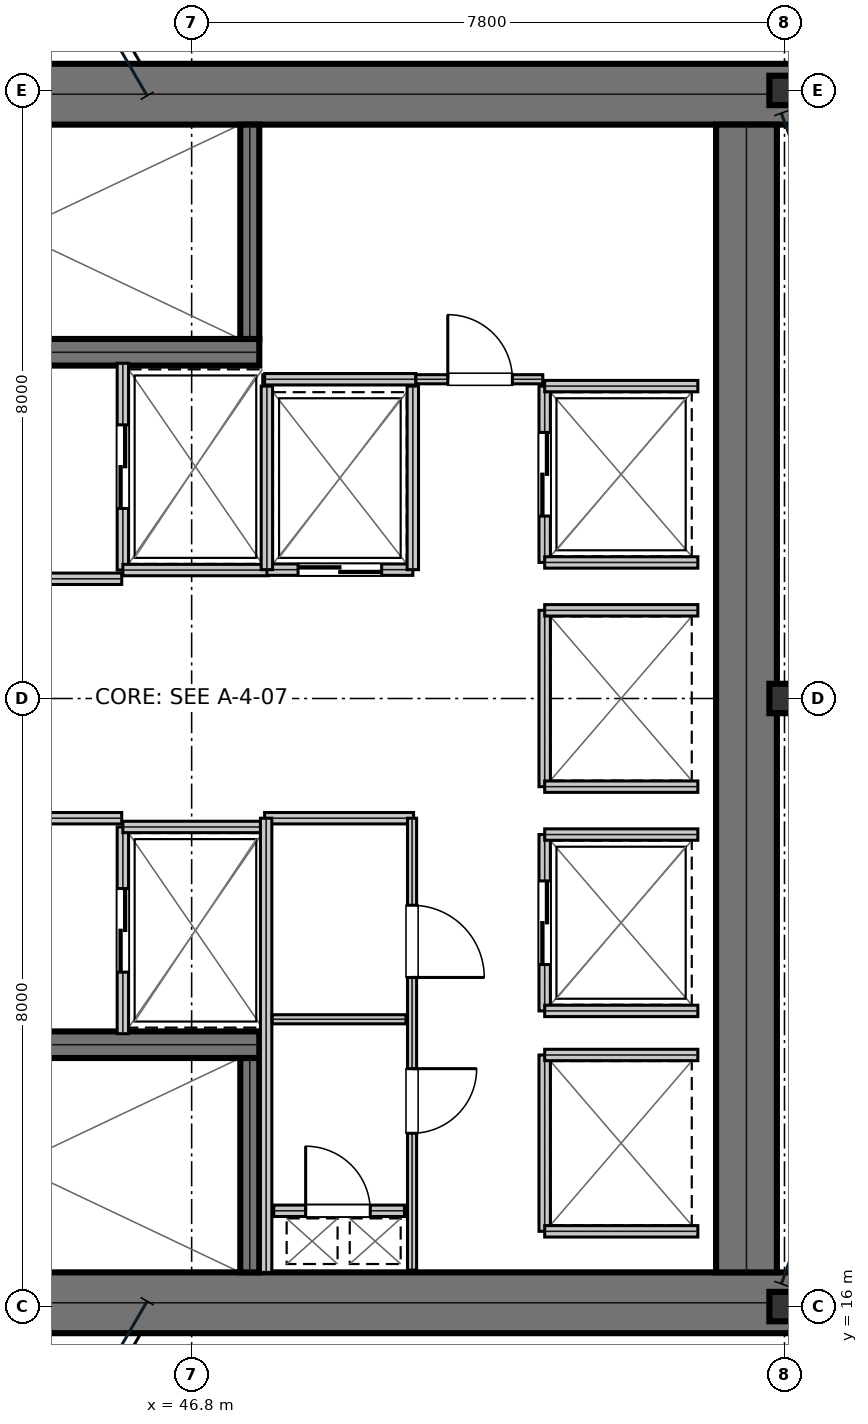
"""IFC4 building model, lengths in metres.
Left out: names, types, materials, properties, quantities, classifications, styles, units other than length and angle.
Written with IfcOpenShell. Run it as: python <this file> out.ifc"""

import sys

from ifc_helpers import new_model, si_unit, direction, frame, frame_2d, origin, origin_2d, place, context, subcontext, project, spatial, rectangle, i_section, extrude, element, fill, save


model = new_model("IFC4")
c1 = context("Model", 3, precision=1e-05, world=origin(), true_north=direction((0.0, 1.0)))
c2 = subcontext(c1, "Body", "Model", "MODEL_VIEW")
j1 = project(units=[si_unit("LENGTHUNIT", "METRE"), si_unit("PLANEANGLEUNIT", "RADIAN")], contexts=[c1])
p1 = place(None, origin())
s1 = spatial("IfcSite", under=j1, at=p1, CompositionType="ELEMENT")
p2 = place(p1, origin())
s2 = spatial("IfcBuilding", under=s1, at=p2, CompositionType="ELEMENT")
p3 = place(p2, frame((0.0, 0.0, 173.55)))
s3 = spatial("IfcBuildingStorey", under=s2, at=p3, CompositionType="ELEMENT", Elevation=173.55)
for number, where, z_axis, x_axis in (
    (1, (38.8, 31.95, 0.0), (0.0, 0.0, 1.0), (1.0, 0.0, 0.0)),
    (2, (38.8, 16.05, 0.0), (0.0, 0.0, 1.0), (1.0, 0.0, 0.0)),
):
    element("IfcWall", number, at=place(p3, frame(where, z_axis=z_axis, x_axis=x_axis)), inside=s3, PredefinedType="SHEAR", context=c2, shape_type="SweptSolid", body=[
        extrude(rectangle(XDim=16.0, YDim=0.8, at=frame_2d((8.0, 0.0))), origin(), (0.0, 0.0, 1.0), 3.81),
    ])
p4 = place(p3, frame((54.1, 16.45, 0.0), z_axis=(0.0, 0.0, 1.0), x_axis=(0.0, 1.0, 0.0)))
e3 = element("IfcWall", 3, at=p4, inside=s3, PredefinedType="SHEAR", context=c2, shape_type="SweptSolid", body=[
    extrude(rectangle(XDim=15.1, YDim=0.8, at=frame_2d((7.55, 0.0))), origin(), (0.0, 0.0, 1.0), 3.81),
])
p5 = place(p3, frame((39.98, 28.555, 0.0), z_axis=(0.0, 0.0, 1.0), x_axis=(1.0, 0.0, 0.0)))
e4 = element("IfcWall", 4, at=p5, inside=s3, PredefinedType="SHEAR", context=c2, shape_type="SweptSolid", body=[
    extrude(rectangle(XDim=7.71, YDim=0.35, at=frame_2d((3.855, 0.0))), origin(), (0.0, 0.0, 1.0), 3.81),
])
p6 = place(p5, frame((0.25, 0.0, 0.0)))
e5 = element("IfcOpeningElement", 5, at=p6, cuts=e4, PredefinedType="OPENING", context=c2, shape_type="SweptSolid", body=[
    extrude(rectangle(XDim=1.1, YDim=2.15, at=frame_2d((0.55, 1.075))), frame((0.0, 0.185, 0.0), z_axis=(0.0, -1.0, 0.0), x_axis=(1.0, 0.0, 0.0)), (0.0, 0.0, 1.0), 0.37),
])
p7 = place(p3, frame((39.98, 19.445, 0.0), z_axis=(0.0, 0.0, 1.0), x_axis=(1.0, 0.0, 0.0)))
e6 = element("IfcWall", 6, at=p7, inside=s3, PredefinedType="SHEAR", context=c2, shape_type="SweptSolid", body=[
    extrude(rectangle(XDim=7.71, YDim=0.35, at=frame_2d((3.855, 0.0))), origin(), (0.0, 0.0, 1.0), 3.81),
])
p8 = place(p7, frame((0.25, 0.0, 0.0)))
e7 = element("IfcOpeningElement", 7, at=p8, cuts=e6, PredefinedType="OPENING", context=c2, shape_type="SweptSolid", body=[
    extrude(rectangle(XDim=1.1, YDim=2.15, at=frame_2d((0.55, 1.075))), frame((0.0, 0.185, 0.0), z_axis=(0.0, -1.0, 0.0), x_axis=(1.0, 0.0, 0.0)), (0.0, 0.0, 1.0), 0.37),
])
for number, where, z_axis, x_axis in (
    (8, (47.565, 28.73, 0.0), (0.0, 0.0, 1.0), (0.0, 1.0, 0.0)),
    (9, (47.565, 16.45, 0.0), (0.0, 0.0, 1.0), (0.0, 1.0, 0.0)),
):
    element("IfcWall", number, at=place(p3, frame(where, z_axis=z_axis, x_axis=x_axis)), inside=s3, PredefinedType="SHEAR", context=c2, shape_type="SweptSolid", body=[
        extrude(rectangle(XDim=2.82, YDim=0.25, at=frame_2d((1.41, 0.0))), origin(), (0.0, 0.0, 1.0), 3.81),
    ])
for number, where, z_axis, x_axis in (
    (10, (54.6, 16.0, 0.0), (0.0, 0.0, 1.0), (1.0, 0.0, 0.0)),
    (11, (54.6, 24.0, 0.0), (0.0, 0.0, 1.0), (1.0, 0.0, 0.0)),
    (12, (54.6, 32.0, 0.0), (0.0, 0.0, 1.0), (1.0, 0.0, 0.0)),
):
    element("IfcColumn", number, at=place(p3, frame(where, z_axis=z_axis, x_axis=x_axis)), inside=s3, PredefinedType="COLUMN", context=c2, shape_type="SweptSolid", body=[
        extrude(i_section(OverallWidth=0.398, OverallDepth=0.387, WebThickness=0.021, FlangeThickness=0.033, at=origin_2d()), origin(), (0.0, 0.0, 1.0), 4.044),
    ])
p9 = place(p3, frame((39.98, 25.575, 0.0), z_axis=(0.0, 0.0, 1.0), x_axis=(1.0, 0.0, 0.0)))
e13 = element("IfcWall", 13, at=p9, inside=s3, PredefinedType="PARTITIONING", context=c2, shape_type="SweptSolid", body=[
    extrude(rectangle(XDim=5.9, YDim=0.15, at=frame_2d((2.95, 0.0))), origin(), (0.0, 0.0, 1.0), 3.81),
])
p10 = place(p9, frame((2.35, 0.0, 0.0)))
e14 = element("IfcOpeningElement", 14, at=p10, cuts=e13, PredefinedType="OPENING", context=c2, shape_type="SweptSolid", body=[
    extrude(rectangle(XDim=1.05, YDim=2.15, at=frame_2d((0.525, 1.075))), frame((0.0, 0.085, 0.0), z_axis=(0.0, -1.0, 0.0), x_axis=(1.0, 0.0, 0.0)), (0.0, 0.0, 1.0), 0.17),
])
p11 = place(p3, frame((39.98, 22.425, 0.0), z_axis=(0.0, 0.0, 1.0), x_axis=(1.0, 0.0, 0.0)))
e15 = element("IfcWall", 15, at=p11, inside=s3, PredefinedType="PARTITIONING", context=c2, shape_type="SweptSolid", body=[
    extrude(rectangle(XDim=5.9, YDim=0.15, at=frame_2d((2.95, 0.0))), origin(), (0.0, 0.0, 1.0), 3.81),
])
p12 = place(p11, frame((2.35, 0.0, 0.0)))
e16 = element("IfcOpeningElement", 16, at=p12, cuts=e15, PredefinedType="OPENING", context=c2, shape_type="SweptSolid", body=[
    extrude(rectangle(XDim=1.05, YDim=2.15, at=frame_2d((0.525, 1.075))), frame((0.0, 0.085, 0.0), z_axis=(0.0, -1.0, 0.0), x_axis=(1.0, 0.0, 0.0)), (0.0, 0.0, 1.0), 0.17),
])
p13 = place(p3, frame((45.895, 25.69, 0.0), z_axis=(0.0, 0.0, 1.0), x_axis=(0.0, 1.0, 0.0)))
e17 = element("IfcWall", 17, at=p13, inside=s3, PredefinedType="PARTITIONING", context=c2, shape_type="SweptSolid", body=[
    extrude(rectangle(XDim=2.72, YDim=0.15, at=frame_2d((1.36, 0.0))), origin(), (0.0, 0.0, 1.0), 3.81),
])
p14 = place(p13, frame((0.81, 0.0, 0.0)))
e18 = element("IfcOpeningElement", 18, at=p14, cuts=e17, PredefinedType="OPENING", context=c2, shape_type="SweptSolid", body=[
    extrude(rectangle(XDim=1.1, YDim=2.15, at=frame_2d((0.55, 1.075))), frame((0.0, 0.085, 0.0), z_axis=(0.0, -1.0, 0.0), x_axis=(1.0, 0.0, 0.0)), (0.0, 0.0, 1.0), 0.17),
])
p15 = place(p3, frame((45.895, 25.69, 0.0), z_axis=(0.0, 0.0, 1.0), x_axis=(1.0, 0.0, 0.0)))
e19 = element("IfcWall", 19, at=p15, inside=s3, PredefinedType="PARTITIONING", context=c2, shape_type="SweptSolid", body=[
    extrude(rectangle(XDim=1.915, YDim=0.15, at=frame_2d((0.958, 0.0))), origin(), (0.0, 0.0, 1.0), 3.81),
])
p16 = place(p3, frame((45.895, 19.59, 0.0), z_axis=(0.0, 0.0, 1.0), x_axis=(0.0, 1.0, 0.0)))
e20 = element("IfcWall", 20, at=p16, inside=s3, PredefinedType="PARTITIONING", context=c2, shape_type="SweptSolid", body=[
    extrude(rectangle(XDim=2.72, YDim=0.15, at=frame_2d((1.36, 0.0))), origin(), (0.0, 0.0, 1.0), 3.81),
])
p17 = place(p16, frame((0.81, 0.0, 0.0)))
e21 = element("IfcOpeningElement", 21, at=p17, cuts=e20, PredefinedType="OPENING", context=c2, shape_type="SweptSolid", body=[
    extrude(rectangle(XDim=1.1, YDim=2.15, at=frame_2d((0.55, 1.075))), frame((0.0, 0.085, 0.0), z_axis=(0.0, -1.0, 0.0), x_axis=(1.0, 0.0, 0.0)), (0.0, 0.0, 1.0), 0.17),
])
p18 = place(p3, frame((45.895, 22.31, 0.0), z_axis=(0.0, 0.0, 1.0), x_axis=(1.0, 0.0, 0.0)))
e22 = element("IfcWall", 22, at=p18, inside=s3, PredefinedType="PARTITIONING", context=c2, shape_type="SweptSolid", body=[
    extrude(rectangle(XDim=1.915, YDim=0.15, at=frame_2d((0.958, 0.0))), origin(), (0.0, 0.0, 1.0), 3.81),
])
p19 = place(p3, frame((47.79, 25.695, 0.0), z_axis=(0.0, 0.0, 1.0), x_axis=(1.0, 0.0, 0.0)))
e23 = element("IfcWall", 23, at=p19, inside=s3, PredefinedType="PARTITIONING", context=c2, shape_type="SweptSolid", body=[
    extrude(rectangle(XDim=1.92, YDim=0.15, at=frame_2d((0.96, 0.0))), origin(), (0.0, 0.0, 1.0), 3.81),
])
p20 = place(p19, frame((0.41, 0.0, 0.0)))
e24 = element("IfcOpeningElement", 24, at=p20, cuts=e23, PredefinedType="OPENING", context=c2, shape_type="SweptSolid", body=[
    extrude(rectangle(XDim=1.1, YDim=2.15, at=frame_2d((0.55, 1.075))), frame((0.0, 0.085, 0.0), z_axis=(0.0, -1.0, 0.0), x_axis=(1.0, 0.0, 0.0)), (0.0, 0.0, 1.0), 0.17),
])
for number, where, z_axis, x_axis in (
    (25, (47.79, 25.695, 0.0), (0.0, 0.0, 1.0), (0.0, 1.0, 0.0)),
    (26, (49.71, 25.695, 0.0), (0.0, 0.0, 1.0), (0.0, 1.0, 0.0)),
):
    element("IfcWall", number, at=place(p3, frame(where, z_axis=z_axis, x_axis=x_axis)), inside=s3, PredefinedType="PARTITIONING", context=c2, shape_type="SweptSolid", body=[
        extrude(rectangle(XDim=2.415, YDim=0.15, at=frame_2d((1.208, 0.0))), origin(), (0.0, 0.0, 1.0), 3.81),
    ])
p21 = place(p3, frame((51.445, 25.79, 0.0), z_axis=(0.0, 0.0, 1.0), x_axis=(0.0, 1.0, 0.0)))
e27 = element("IfcWall", 27, at=p21, inside=s3, PredefinedType="PARTITIONING", context=c2, shape_type="SweptSolid", body=[
    extrude(rectangle(XDim=2.32, YDim=0.15, at=frame_2d((1.16, 0.0))), origin(), (0.0, 0.0, 1.0), 3.81),
])
p22 = place(p21, frame((0.61, 0.0, 0.0)))
e28 = element("IfcOpeningElement", 28, at=p22, cuts=e27, PredefinedType="OPENING", context=c2, shape_type="SweptSolid", body=[
    extrude(rectangle(XDim=1.1, YDim=2.15, at=frame_2d((0.55, 1.075))), frame((0.0, 0.085, 0.0), z_axis=(0.0, -1.0, 0.0), x_axis=(1.0, 0.0, 0.0)), (0.0, 0.0, 1.0), 0.17),
])
for number, where, z_axis, x_axis in (
    (29, (51.445, 25.79, 0.0), (0.0, 0.0, 1.0), (1.0, 0.0, 0.0)),
    (30, (51.445, 28.11, 0.0), (0.0, 0.0, 1.0), (1.0, 0.0, 0.0)),
):
    element("IfcWall", number, at=place(p3, frame(where, z_axis=z_axis, x_axis=x_axis)), inside=s3, PredefinedType="PARTITIONING", context=c2, shape_type="SweptSolid", body=[
        extrude(rectangle(XDim=2.015, YDim=0.15, at=frame_2d((1.007, 0.0))), origin(), (0.0, 0.0, 1.0), 3.81),
    ])
p23 = place(p3, frame((51.445, 19.89, 0.0), z_axis=(0.0, 0.0, 1.0), x_axis=(0.0, 1.0, 0.0)))
e31 = element("IfcWall", 31, at=p23, inside=s3, PredefinedType="PARTITIONING", context=c2, shape_type="SweptSolid", body=[
    extrude(rectangle(XDim=2.32, YDim=0.15, at=frame_2d((1.16, 0.0))), origin(), (0.0, 0.0, 1.0), 3.81),
])
p24 = place(p23, frame((0.61, 0.0, 0.0)))
e32 = element("IfcOpeningElement", 32, at=p24, cuts=e31, PredefinedType="OPENING", context=c2, shape_type="SweptSolid", body=[
    extrude(rectangle(XDim=1.1, YDim=2.15, at=frame_2d((0.55, 1.075))), frame((0.0, 0.085, 0.0), z_axis=(0.0, -1.0, 0.0), x_axis=(1.0, 0.0, 0.0)), (0.0, 0.0, 1.0), 0.17),
])
for number, where, z_axis, x_axis in (
    (33, (51.445, 19.89, 0.0), (0.0, 0.0, 1.0), (1.0, 0.0, 0.0)),
    (34, (51.445, 22.21, 0.0), (0.0, 0.0, 1.0), (1.0, 0.0, 0.0)),
):
    element("IfcWall", number, at=place(p3, frame(where, z_axis=z_axis, x_axis=x_axis)), inside=s3, PredefinedType="PARTITIONING", context=c2, shape_type="SweptSolid", body=[
        extrude(rectangle(XDim=2.015, YDim=0.15, at=frame_2d((1.007, 0.0))), origin(), (0.0, 0.0, 1.0), 3.81),
    ])
p25 = place(p3, frame((51.445, 22.84, 0.0), z_axis=(0.0, 0.0, 1.0), x_axis=(0.0, 1.0, 0.0)))
e35 = element("IfcWall", 35, at=p25, inside=s3, PredefinedType="PARTITIONING", context=c2, shape_type="SweptSolid", body=[
    extrude(rectangle(XDim=2.32, YDim=0.15, at=frame_2d((1.16, 0.0))), origin(), (0.0, 0.0, 1.0), 3.81),
])
for number, where, z_axis, x_axis in (
    (36, (51.445, 22.84, 0.0), (0.0, 0.0, 1.0), (1.0, 0.0, 0.0)),
    (37, (51.445, 25.16, 0.0), (0.0, 0.0, 1.0), (1.0, 0.0, 0.0)),
):
    element("IfcWall", number, at=place(p3, frame(where, z_axis=z_axis, x_axis=x_axis)), inside=s3, PredefinedType="PARTITIONING", context=c2, shape_type="SweptSolid", body=[
        extrude(rectangle(XDim=2.015, YDim=0.15, at=frame_2d((1.007, 0.0))), origin(), (0.0, 0.0, 1.0), 3.81),
    ])
p26 = place(p3, frame((51.445, 16.99, 0.0), z_axis=(0.0, 0.0, 1.0), x_axis=(0.0, 1.0, 0.0)))
e38 = element("IfcWall", 38, at=p26, inside=s3, PredefinedType="PARTITIONING", context=c2, shape_type="SweptSolid", body=[
    extrude(rectangle(XDim=2.32, YDim=0.15, at=frame_2d((1.16, 0.0))), origin(), (0.0, 0.0, 1.0), 3.81),
])
for number, where, z_axis, x_axis in (
    (39, (51.445, 16.99, 0.0), (0.0, 0.0, 1.0), (1.0, 0.0, 0.0)),
    (40, (51.445, 19.31, 0.0), (0.0, 0.0, 1.0), (1.0, 0.0, 0.0)),
):
    element("IfcWall", number, at=place(p3, frame(where, z_axis=z_axis, x_axis=x_axis)), inside=s3, PredefinedType="PARTITIONING", context=c2, shape_type="SweptSolid", body=[
        extrude(rectangle(XDim=2.015, YDim=0.15, at=frame_2d((1.007, 0.0))), origin(), (0.0, 0.0, 1.0), 3.81),
    ])
p27 = place(p3, frame((47.88, 17.26, 0.0), z_axis=(0.0, 0.0, 1.0), x_axis=(1.0, 0.0, 0.0)))
e41 = element("IfcWall", 41, at=p27, inside=s3, PredefinedType="PARTITIONING", context=c2, shape_type="SweptSolid", body=[
    extrude(rectangle(XDim=1.72, YDim=0.15, at=frame_2d((0.86, 0.0))), origin(), (0.0, 0.0, 1.0), 3.81),
])
p28 = place(p27, frame((0.42, 0.0, 0.0)))
e42 = element("IfcOpeningElement", 42, at=p28, cuts=e41, PredefinedType="OPENING", context=c2, shape_type="SweptSolid", body=[
    extrude(rectangle(XDim=0.85, YDim=2.15, at=frame_2d((0.425, 1.075))), frame((0.0, 0.085, 0.0), z_axis=(0.0, -1.0, 0.0), x_axis=(1.0, 0.0, 0.0)), (0.0, 0.0, 1.0), 0.17),
])
p29 = place(p3, frame((47.76, 22.425, 0.0), z_axis=(0.0, 0.0, 1.0), x_axis=(1.0, 0.0, 0.0)))
e43 = element("IfcWall", 43, at=p29, inside=s3, PredefinedType="PARTITIONING", context=c2, shape_type="SweptSolid", body=[
    extrude(rectangle(XDim=1.96, YDim=0.15, at=frame_2d((0.98, 0.0))), origin(), (0.0, 0.0, 1.0), 3.81),
])
p30 = place(p3, frame((47.78, 16.45, 0.0), z_axis=(0.0, 0.0, 1.0), x_axis=(0.0, 1.0, 0.0)))
e44 = element("IfcWall", 44, at=p30, inside=s3, PredefinedType="PARTITIONING", context=c2, shape_type="SweptSolid", body=[
    extrude(rectangle(XDim=5.975, YDim=0.15, at=frame_2d((2.988, 0.0))), origin(), (0.0, 0.0, 1.0), 3.81),
])
p31 = place(p3, frame((47.86, 19.78, 0.0), z_axis=(0.0, 0.0, 1.0), x_axis=(1.0, 0.0, 0.0)))
e45 = element("IfcWall", 45, at=p31, inside=s3, PredefinedType="PARTITIONING", context=c2, shape_type="SweptSolid", body=[
    extrude(rectangle(XDim=1.76, YDim=0.12, at=frame_2d((0.88, 0.0))), origin(), (0.0, 0.0, 1.0), 3.81),
])
p32 = place(p3, frame((49.7, 16.48, 0.0), z_axis=(0.0, 0.0, 1.0), x_axis=(0.0, 1.0, 0.0)))
e46 = element("IfcWall", 46, at=p32, inside=s3, PredefinedType="PARTITIONING", context=c2, shape_type="SweptSolid", body=[
    extrude(rectangle(XDim=5.945, YDim=0.12, at=frame_2d((2.973, 0.0))), origin(), (0.0, 0.0, 1.0), 3.81),
])
p33 = place(p32, frame((1.8, 0.0, 0.0)))
e47 = element("IfcOpeningElement", 47, at=p33, cuts=e46, PredefinedType="OPENING", context=c2, shape_type="SweptSolid", body=[
    extrude(rectangle(XDim=0.85, YDim=2.15, at=frame_2d((0.425, 1.075))), frame((0.0, 0.07, 0.0), z_axis=(0.0, -1.0, 0.0), x_axis=(1.0, 0.0, 0.0)), (0.0, 0.0, 1.0), 0.14),
])
p34 = place(p32, frame((3.85, 0.0, 0.0)))
e48 = element("IfcOpeningElement", 48, at=p34, cuts=e46, PredefinedType="OPENING", context=c2, shape_type="SweptSolid", body=[
    extrude(rectangle(XDim=0.95, YDim=2.15, at=frame_2d((0.475, 1.075))), frame((0.0, 0.07, 0.0), z_axis=(0.0, -1.0, 0.0), x_axis=(1.0, 0.0, 0.0)), (0.0, 0.0, 1.0), 0.14),
])
p35 = place(p3, frame((47.76, 28.2, 0.0), z_axis=(0.0, 0.0, 1.0), x_axis=(1.0, 0.0, 0.0)))
e49 = element("IfcWall", 49, at=p35, inside=s3, PredefinedType="PARTITIONING", context=c2, shape_type="SweptSolid", body=[
    extrude(rectangle(XDim=1.99, YDim=0.15, at=frame_2d((0.995, 0.0))), origin(), (0.0, 0.0, 1.0), 3.81),
])
p36 = place(p3, frame((49.75, 28.2, 0.0), z_axis=(0.0, 0.0, 1.0), x_axis=(1.0, 0.0, 0.0)))
e50 = element("IfcWall", 50, at=p36, inside=s3, PredefinedType="PARTITIONING", context=c2, shape_type="SweptSolid", body=[
    extrude(rectangle(XDim=1.67, YDim=0.12, at=frame_2d((0.835, 0.0))), origin(), (0.0, 0.0, 1.0), 3.81),
])
p37 = place(p36, frame((0.42, 0.0, 0.0)))
e51 = element("IfcOpeningElement", 51, at=p37, cuts=e50, PredefinedType="OPENING", context=c2, shape_type="SweptSolid", body=[
    extrude(rectangle(XDim=0.85, YDim=2.15, at=frame_2d((0.425, 1.075))), frame((0.0, 0.07, 0.0), z_axis=(0.0, -1.0, 0.0), x_axis=(1.0, 0.0, 0.0)), (0.0, 0.0, 1.0), 0.14),
])
p38 = place(p14, frame((1.1, 0.0, 0.0), z_axis=(0.0, 0.0, 1.0), x_axis=(-1.0, 0.0, 0.0)))
e52 = element("IfcDoor", 52, at=p38, inside=s3, OperationType="DOUBLE_DOOR_SLIDING", PredefinedType="DOOR", context=c2, shape_type="SweptSolid", body=[
    extrude(rectangle(XDim=1.1, YDim=2.15, at=frame_2d((0.55, 1.075))), frame((0.0, 0.025, 0.0), z_axis=(0.0, -1.0, 0.0), x_axis=(1.0, 0.0, 0.0)), (0.0, 0.0, 1.0), 0.05),
])
fill(e18, e52)
p39 = place(p17, frame((1.1, 0.0, 0.0), z_axis=(0.0, 0.0, 1.0), x_axis=(-1.0, 0.0, 0.0)))
e53 = element("IfcDoor", 53, at=p39, inside=s3, OperationType="DOUBLE_DOOR_SLIDING", PredefinedType="DOOR", context=c2, shape_type="SweptSolid", body=[
    extrude(rectangle(XDim=1.1, YDim=2.15, at=frame_2d((0.55, 1.075))), frame((0.0, 0.025, 0.0), z_axis=(0.0, -1.0, 0.0), x_axis=(1.0, 0.0, 0.0)), (0.0, 0.0, 1.0), 0.05),
])
fill(e21, e53)
p40 = place(p20, frame((1.1, 0.0, 0.0), z_axis=(0.0, 0.0, 1.0), x_axis=(-1.0, 0.0, 0.0)))
e54 = element("IfcDoor", 54, at=p40, inside=s3, OperationType="DOUBLE_DOOR_SLIDING", PredefinedType="DOOR", context=c2, shape_type="SweptSolid", body=[
    extrude(rectangle(XDim=1.1, YDim=2.15, at=frame_2d((0.55, 1.075))), frame((0.0, 0.025, 0.0), z_axis=(0.0, -1.0, 0.0), x_axis=(1.0, 0.0, 0.0)), (0.0, 0.0, 1.0), 0.05),
])
fill(e24, e54)
p41 = place(p22, frame((1.1, 0.0, 0.0), z_axis=(0.0, 0.0, 1.0), x_axis=(-1.0, 0.0, 0.0)))
e55 = element("IfcDoor", 55, at=p41, inside=s3, OperationType="DOUBLE_DOOR_SLIDING", PredefinedType="DOOR", context=c2, shape_type="SweptSolid", body=[
    extrude(rectangle(XDim=1.1, YDim=2.15, at=frame_2d((0.55, 1.075))), frame((0.0, 0.025, 0.0), z_axis=(0.0, -1.0, 0.0), x_axis=(1.0, 0.0, 0.0)), (0.0, 0.0, 1.0), 0.05),
])
fill(e28, e55)
p42 = place(p24, frame((1.1, 0.0, 0.0), z_axis=(0.0, 0.0, 1.0), x_axis=(-1.0, 0.0, 0.0)))
e56 = element("IfcDoor", 56, at=p42, inside=s3, OperationType="DOUBLE_DOOR_SLIDING", PredefinedType="DOOR", context=c2, shape_type="SweptSolid", body=[
    extrude(rectangle(XDim=1.1, YDim=2.15, at=frame_2d((0.55, 1.075))), frame((0.0, 0.025, 0.0), z_axis=(0.0, -1.0, 0.0), x_axis=(1.0, 0.0, 0.0)), (0.0, 0.0, 1.0), 0.05),
])
fill(e32, e56)
p43 = place(p28, origin())
e57 = element("IfcDoor", 57, at=p43, inside=s3, OperationType="SINGLE_SWING_LEFT", PredefinedType="TRAPDOOR", context=c2, shape_type="SweptSolid", body=[
    extrude(rectangle(XDim=0.85, YDim=2.15, at=frame_2d((0.425, 1.075))), frame((0.0, 0.025, 0.0), z_axis=(0.0, -1.0, 0.0), x_axis=(1.0, 0.0, 0.0)), (0.0, 0.0, 1.0), 0.05),
])
fill(e42, e57)
p44 = place(p33, frame((0.85, 0.0, 0.0), z_axis=(0.0, 0.0, 1.0), x_axis=(-1.0, 0.0, 0.0)))
e58 = element("IfcDoor", 58, at=p44, inside=s3, OperationType="SINGLE_SWING_LEFT", PredefinedType="DOOR", context=c2, shape_type="SweptSolid", body=[
    extrude(rectangle(XDim=0.85, YDim=2.15, at=frame_2d((0.425, 1.075))), frame((0.0, 0.025, 0.0), z_axis=(0.0, -1.0, 0.0), x_axis=(1.0, 0.0, 0.0)), (0.0, 0.0, 1.0), 0.05),
])
fill(e47, e58)
p45 = place(p34, frame((0.95, 0.0, 0.0), z_axis=(0.0, 0.0, 1.0), x_axis=(-1.0, 0.0, 0.0)))
e59 = element("IfcDoor", 59, at=p45, inside=s3, OperationType="SINGLE_SWING_RIGHT", PredefinedType="DOOR", context=c2, shape_type="SweptSolid", body=[
    extrude(rectangle(XDim=0.95, YDim=2.15, at=frame_2d((0.475, 1.075))), frame((0.0, 0.025, 0.0), z_axis=(0.0, -1.0, 0.0), x_axis=(1.0, 0.0, 0.0)), (0.0, 0.0, 1.0), 0.05),
])
fill(e48, e59)
p46 = place(p37, origin())
e60 = element("IfcDoor", 60, at=p46, inside=s3, OperationType="SINGLE_SWING_LEFT", PredefinedType="DOOR", context=c2, shape_type="SweptSolid", body=[
    extrude(rectangle(XDim=0.85, YDim=2.15, at=frame_2d((0.425, 1.075))), frame((0.0, 0.025, 0.0), z_axis=(0.0, -1.0, 0.0), x_axis=(1.0, 0.0, 0.0)), (0.0, 0.0, 1.0), 0.05),
])
fill(e51, e60)
save(model, sys.argv[1])
